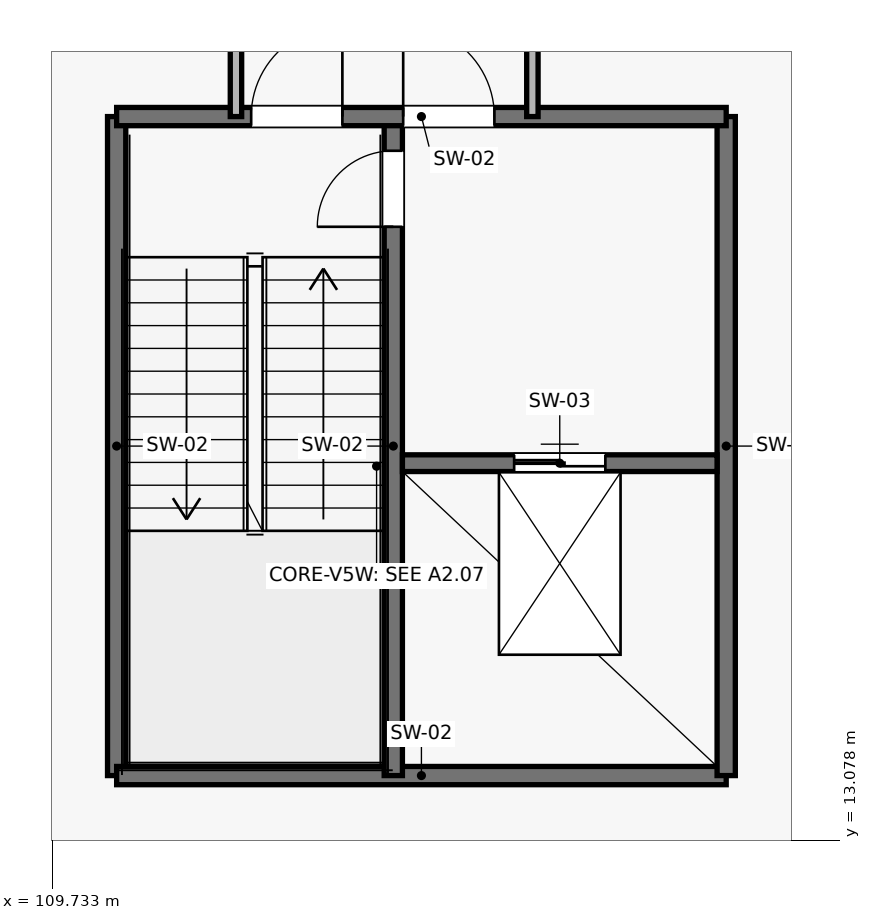
"""IFC4 building model, lengths in metres.
Left out: names, types, materials, properties, quantities, classifications, styles, units other than length and angle.
Written with IfcOpenShell. Run it as: python <this file> out.ifc"""

import sys

from ifc_helpers import new_model, si_unit, direction, frame, frame_2d, origin, place, context, subcontext, project, spatial, rectangle, extrude, element, fill, save


model = new_model("IFC4")
c1 = context("Model", 3, precision=1e-05, world=origin(), true_north=direction((0.0, 1.0)))
c2 = subcontext(c1, "Body", "Model", "MODEL_VIEW")
j1 = project(units=[si_unit("LENGTHUNIT", "METRE"), si_unit("PLANEANGLEUNIT", "RADIAN")], contexts=[c1])
p1 = place(None, origin())
s1 = spatial("IfcSite", under=j1, at=p1, CompositionType="ELEMENT")
p2 = place(p1, origin())
s2 = spatial("IfcBuilding", under=s1, at=p2, CompositionType="ELEMENT")
p3 = place(p2, frame((0.0, 0.0, 6.6)))
s3 = spatial("IfcBuildingStorey", under=s2, at=p3, CompositionType="ELEMENT", Elevation=6.6)
p4 = place(p3, frame((110.58, 22.6, 0.0), z_axis=(0.0, 0.0, 1.0), x_axis=(0.0, -1.0, 0.0)))
e1 = element("IfcWall", 1, at=p4, inside=s3, PredefinedType="SHEAR", context=c2, shape_type="SweptSolid", body=[
    extrude(rectangle(XDim=8.67, YDim=0.24, at=frame_2d((4.335, 0.0))), origin(), (0.0, 0.0, 1.0), 4.45),
])
p5 = place(p3, frame((110.58, 13.93, 0.0), z_axis=(0.0, 0.0, 1.0), x_axis=(1.0, 0.0, 0.0)))
e2 = element("IfcWall", 2, at=p5, inside=s3, PredefinedType="SHEAR", context=c2, shape_type="SweptSolid", body=[
    extrude(rectangle(XDim=8.02, YDim=0.24, at=frame_2d((4.01, 0.0))), origin(), (0.0, 0.0, 1.0), 4.45),
])
p6 = place(p3, frame((114.22, 13.93, 0.0), z_axis=(0.0, 0.0, 1.0), x_axis=(0.0, 1.0, 0.0)))
e3 = element("IfcWall", 3, at=p6, inside=s3, PredefinedType="SHEAR", context=c2, shape_type="SweptSolid", body=[
    extrude(rectangle(XDim=8.67, YDim=0.24, at=frame_2d((4.335, 0.0))), origin(), (0.0, 0.0, 1.0), 4.45),
])
p7 = place(p6, frame((7.22, 0.0, 0.0)))
e4 = element("IfcOpeningElement", 4, at=p7, cuts=e3, PredefinedType="OPENING", context=c2, shape_type="SweptSolid", body=[
    extrude(rectangle(XDim=1.0, YDim=2.2, at=frame_2d((0.5, 1.1))), frame((0.0, 0.135, 0.0), z_axis=(0.0, -1.0, 0.0), x_axis=(1.0, 0.0, 0.0)), (0.0, 0.0, 1.0), 0.27),
])
p8 = place(p3, frame((118.6, 13.93, 0.0), z_axis=(0.0, 0.0, 1.0), x_axis=(0.0, 1.0, 0.0)))
e5 = element("IfcWall", 5, at=p8, inside=s3, PredefinedType="SHEAR", context=c2, shape_type="SweptSolid", body=[
    extrude(rectangle(XDim=8.67, YDim=0.24, at=frame_2d((4.335, 0.0))), origin(), (0.0, 0.0, 1.0), 4.45),
])
p9 = place(p3, frame((110.58, 22.6, 0.0), z_axis=(0.0, 0.0, 1.0), x_axis=(1.0, 0.0, 0.0)))
e6 = element("IfcWall", 6, at=p9, inside=s3, PredefinedType="SHEAR", context=c2, shape_type="SweptSolid", body=[
    extrude(rectangle(XDim=8.02, YDim=0.24, at=frame_2d((4.01, 0.0))), origin(), (0.0, 0.0, 1.0), 4.45),
])
p10 = place(p9, frame((1.77, 0.0, 0.0)))
e7 = element("IfcOpeningElement", 7, at=p10, cuts=e6, PredefinedType="OPENING", context=c2, shape_type="SweptSolid", body=[
    extrude(rectangle(XDim=1.2, YDim=2.2, at=frame_2d((0.6, 1.1))), frame((0.0, 0.135, 0.0), z_axis=(0.0, -1.0, 0.0), x_axis=(1.0, 0.0, 0.0)), (0.0, 0.0, 1.0), 0.27),
])
p11 = place(p9, frame((3.77, 0.0, 0.0)))
e8 = element("IfcOpeningElement", 8, at=p11, cuts=e6, PredefinedType="OPENING", context=c2, shape_type="SweptSolid", body=[
    extrude(rectangle(XDim=1.2, YDim=2.2, at=frame_2d((0.6, 1.1))), frame((0.0, 0.135, 0.0), z_axis=(0.0, -1.0, 0.0), x_axis=(1.0, 0.0, 0.0)), (0.0, 0.0, 1.0), 0.27),
])
p12 = place(p3, frame((114.34, 18.04, 0.0), z_axis=(0.0, 0.0, 1.0), x_axis=(1.0, 0.0, 0.0)))
e9 = element("IfcWall", 9, at=p12, inside=s3, PredefinedType="SHEAR", context=c2, shape_type="SweptSolid", body=[
    extrude(rectangle(XDim=4.14, YDim=0.22, at=frame_2d((2.07, 0.0))), origin(), (0.0, 0.0, 1.0), 4.45),
])
p13 = place(p12, frame((1.47, 0.0, 0.0)))
e10 = element("IfcOpeningElement", 10, at=p13, cuts=e9, PredefinedType="OPENING", context=c2, shape_type="SweptSolid", body=[
    extrude(rectangle(XDim=1.2, YDim=2.2, at=frame_2d((0.6, 1.1))), frame((0.0, 0.125, 0.0), z_axis=(0.0, -1.0, 0.0), x_axis=(1.0, 0.0, 0.0)), (0.0, 0.0, 1.0), 0.25),
])
p14 = place(p3, frame((112.15, 22.6, 0.0), z_axis=(0.0, 0.0, 1.0), x_axis=(0.0, 1.0, 0.0)))
e11 = element("IfcWall", 11, at=p14, inside=s3, PredefinedType="PARTITIONING", context=c2, shape_type="SweptSolid", body=[
    extrude(rectangle(XDim=15.2, YDim=0.15, at=frame_2d((7.6, 0.0))), origin(), (0.0, 0.0, 1.0), 3.463),
])
p15 = place(p14, frame((5.5, 0.0, 0.0)))
e12 = element("IfcOpeningElement", 12, at=p15, cuts=e11, PredefinedType="OPENING", context=c2, shape_type="SweptSolid", body=[
    extrude(rectangle(XDim=1.0, YDim=2.2, at=frame_2d((0.5, 1.1))), frame((0.0, 0.09, 0.0), z_axis=(0.0, -1.0, 0.0), x_axis=(1.0, 0.0, 0.0)), (0.0, 0.0, 1.0), 0.18),
])
p16 = place(p3, frame((116.05, 22.6, 0.0), z_axis=(0.0, 0.0, 1.0), x_axis=(0.0, 1.0, 0.0)))
e13 = element("IfcWall", 13, at=p16, inside=s3, PredefinedType="PARTITIONING", context=c2, shape_type="SweptSolid", body=[
    extrude(rectangle(XDim=15.2, YDim=0.15, at=frame_2d((7.6, 0.0))), origin(), (0.0, 0.0, 1.0), 3.463),
])
p17 = place(p16, frame((5.5, 0.0, 0.0)))
e14 = element("IfcOpeningElement", 14, at=p17, cuts=e13, PredefinedType="OPENING", context=c2, shape_type="SweptSolid", body=[
    extrude(rectangle(XDim=1.0, YDim=2.2, at=frame_2d((0.5, 1.1))), frame((0.0, 0.09, 0.0), z_axis=(0.0, -1.0, 0.0), x_axis=(1.0, 0.0, 0.0)), (0.0, 0.0, 1.0), 0.18),
])
p18 = place(p10, origin())
e15 = element("IfcDoor", 15, at=p18, inside=s3, OperationType="SINGLE_SWING_RIGHT", PredefinedType="DOOR", context=c2, shape_type="SweptSolid", body=[
    extrude(rectangle(XDim=1.2, YDim=2.2, at=frame_2d((0.6, 1.1))), frame((0.0, 0.025, 0.0), z_axis=(0.0, -1.0, 0.0), x_axis=(1.0, 0.0, 0.0)), (0.0, 0.0, 1.0), 0.05),
])
fill(e7, e15)
p19 = place(p11, origin())
e16 = element("IfcDoor", 16, at=p19, inside=s3, OperationType="SINGLE_SWING_LEFT", PredefinedType="DOOR", context=c2, shape_type="SweptSolid", body=[
    extrude(rectangle(XDim=1.2, YDim=2.2, at=frame_2d((0.6, 1.1))), frame((0.0, 0.025, 0.0), z_axis=(0.0, -1.0, 0.0), x_axis=(1.0, 0.0, 0.0)), (0.0, 0.0, 1.0), 0.05),
])
fill(e8, e16)
p20 = place(p7, origin())
e17 = element("IfcDoor", 17, at=p20, inside=s3, OperationType="SINGLE_SWING_LEFT", PredefinedType="DOOR", context=c2, shape_type="SweptSolid", body=[
    extrude(rectangle(XDim=1.0, YDim=2.2, at=frame_2d((0.5, 1.1))), frame((0.0, 0.025, 0.0), z_axis=(0.0, -1.0, 0.0), x_axis=(1.0, 0.0, 0.0)), (0.0, 0.0, 1.0), 0.05),
])
fill(e4, e17)
p21 = place(p13, origin())
e18 = element("IfcDoor", 18, at=p21, inside=s3, OperationType="DOUBLE_DOOR_SLIDING", PredefinedType="DOOR", context=c2, shape_type="SweptSolid", body=[
    extrude(rectangle(XDim=1.2, YDim=2.2, at=frame_2d((0.6, 1.1))), frame((0.0, 0.025, 0.0), z_axis=(0.0, -1.0, 0.0), x_axis=(1.0, 0.0, 0.0)), (0.0, 0.0, 1.0), 0.05),
])
fill(e10, e18)
save(model, sys.argv[1])
